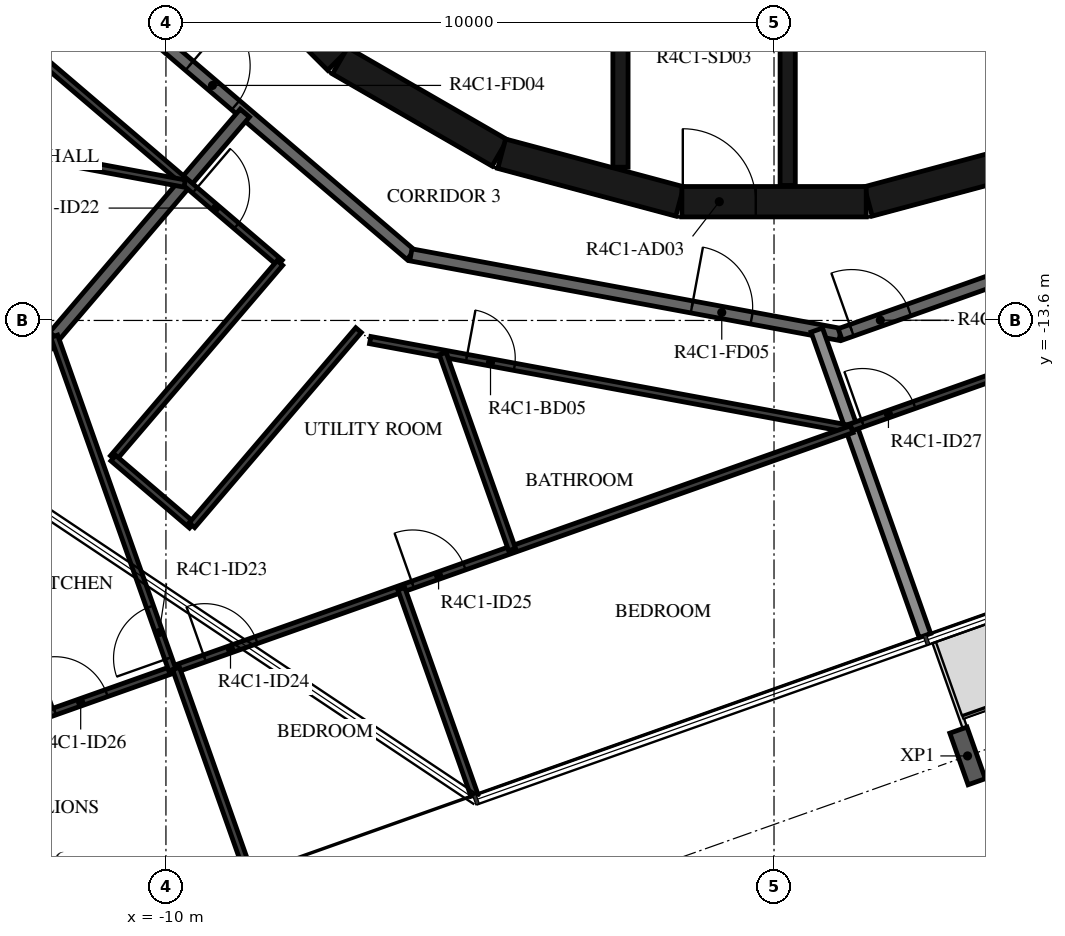
"""IFC4 building model, lengths in metres.
Left out: names, types, materials, properties, quantities, classifications, styles, units other than length and angle.
Written with IfcOpenShell. Run it as: python <this file> out.ifc"""

import sys

from ifc_helpers import new_model, si_unit, direction, frame, frame_2d, origin, origin_2d, place, context, subcontext, project, spatial, rectangle, i_section, extrude, element, fill, save


model = new_model("IFC4")
c1 = context("Model", 3, precision=1e-05, world=origin(), true_north=direction((0.0, 1.0)))
c2 = subcontext(c1, "Body", "Model", "MODEL_VIEW")
j1 = project(units=[si_unit("LENGTHUNIT", "METRE"), si_unit("PLANEANGLEUNIT", "RADIAN")], contexts=[c1])
p1 = place(None, origin())
s1 = spatial("IfcSite", under=j1, at=p1, CompositionType="ELEMENT")
p2 = place(p1, origin())
s2 = spatial("IfcBuilding", under=s1, at=p2, CompositionType="ELEMENT")
p3 = place(p2, frame((0.0, 0.0, 176.2)))
s3 = spatial("IfcBuildingStorey", under=s2, at=p3, CompositionType="ELEMENT", Elevation=176.2)
p4 = place(p3, frame((3.183, -20.761, -0.38), z_axis=(0.0, 0.0, 1.0), x_axis=(-0.942641392079, -0.333807138839, 0.0)))
e1 = element("IfcColumn", 1, at=p4, inside=s3, PredefinedType="COLUMN", context=c2, shape_type="SweptSolid", body=[
    extrude(i_section(OverallWidth=0.3, OverallDepth=0.9, WebThickness=0.019, FlangeThickness=0.035, FilletRadius=0.03, at=origin_2d()), origin(), (0.0, 0.0, 1.0), 3.5),
])
p5 = place(p3, frame((1.55, -11.643, 0.0), z_axis=(0.0, 0.0, 1.0), x_axis=(0.965948410781, 0.258734743916, 0.0)))
e2 = element("IfcWall", 2, at=p5, inside=s3, PredefinedType="SHEAR", context=c2, shape_type="SweptSolid", body=[
    extrude(rectangle(XDim=3.033, YDim=0.5, at=frame_2d((1.516, 0.0))), origin(), (0.0, 0.0, 1.0), 3.12),
])
p6 = place(p3, frame((-9.308, -7.164, 0.0), z_axis=(0.0, 0.0, 1.0), x_axis=(0.707106781187, -0.707106781187, 0.0)))
e3 = element("IfcWall", 3, at=p6, inside=s3, PredefinedType="SHEAR", context=c2, shape_type="SweptSolid", body=[
    extrude(rectangle(XDim=3.032, YDim=0.5, at=frame_2d((1.516, 0.0))), origin(), (0.0, 0.0, 1.0), 3.12),
])
for number, where, z_axis, x_axis in (
    (4, (-7.137, -9.329, 0.0), (0.0, 0.0, 1.0), (0.866, -0.5, 0.0)),
    (5, (-4.479, -10.858, 0.0), (0.0, 0.0, 1.0), (0.966, -0.259, 0.0)),
):
    element("IfcWall", number, at=place(p3, frame(where, z_axis=z_axis, x_axis=x_axis)), inside=s3, PredefinedType="SHEAR", context=c2, shape_type="SweptSolid", body=[
        extrude(rectangle(XDim=3.033, YDim=0.5, at=frame_2d((1.516, 0.0))), origin(), (0.0, 0.0, 1.0), 3.12),
    ])
p7 = place(p3, frame((-1.516, -11.647, 0.0), z_axis=(0.0, 0.0, 1.0), x_axis=(1.0, 0.0, 0.0)))
e6 = element("IfcWall", 6, at=p7, inside=s3, PredefinedType="SHEAR", context=c2, shape_type="SweptSolid", body=[
    extrude(rectangle(XDim=3.033, YDim=0.5, at=frame_2d((1.516, 0.0))), origin(), (0.0, 0.0, 1.0), 3.12),
])
p8 = place(p7, frame((0.016, 0.0, 0.0)))
e7 = element("IfcOpeningElement", 7, at=p8, cuts=e6, PredefinedType="OPENING", context=c2, shape_type="SweptSolid", body=[
    extrude(rectangle(XDim=1.2, YDim=2.1, at=frame_2d((0.6, 1.05))), frame((0.0, 0.26, 0.0), z_axis=(0.0, -1.0, 0.0), x_axis=(1.0, 0.0, 0.0)), (0.0, 0.0, 1.0), 0.52),
])
p9 = place(p3, frame((-2.525, -8.97, 0.0), z_axis=(0.0, 0.0, 1.0), x_axis=(0.0, -1.0, 0.0)))
e8 = element("IfcWall", 8, at=p9, inside=s3, PredefinedType="SHEAR", context=c2, shape_type="SweptSolid", body=[
    extrude(rectangle(XDim=2.11, YDim=0.25, at=frame_2d((1.055, 0.0))), origin(), (0.0, 0.0, 1.0), 3.12),
])
p10 = place(p3, frame((0.225, -8.97, 0.0), z_axis=(0.0, 0.0, 1.0), x_axis=(0.0, -1.0, 0.0)))
e9 = element("IfcWall", 9, at=p10, inside=s3, PredefinedType="SHEAR", context=c2, shape_type="SweptSolid", body=[
    extrude(rectangle(XDim=2.41, YDim=0.25, at=frame_2d((1.205, 0.0))), origin(), (0.0, 0.0, 1.0), 3.12),
])
p11 = place(p3, frame((-11.433, -7.858, 0.0), z_axis=(0.0, 0.0, 1.0), x_axis=(0.760412154545, -0.649440801937, 0.0)))
e10 = element("IfcWall", 10, at=p11, inside=s3, PredefinedType="STANDARD", context=c2, shape_type="SweptSolid", body=[
    extrude(rectangle(XDim=7.181, YDim=0.2, at=frame_2d((3.59, 0.0))), origin(), (0.0, 0.0, 1.0), 3.12),
])
p12 = place(p11, frame((2.39, 0.0, 0.0)))
e11 = element("IfcOpeningElement", 11, at=p12, cuts=e10, PredefinedType="OPENING", context=c2, shape_type="SweptSolid", body=[
    extrude(rectangle(XDim=1.0, YDim=2.1, at=frame_2d((0.5, 1.05))), frame((0.0, 0.11, 0.0), z_axis=(0.0, -1.0, 0.0), x_axis=(1.0, 0.0, 0.0)), (0.0, 0.0, 1.0), 0.22),
])
p13 = place(p3, frame((-5.972, -12.521, 0.0), z_axis=(0.0, 0.0, 1.0), x_axis=(0.983256068163, -0.18222926335, 0.0)))
e12 = element("IfcWall", 12, at=p13, inside=s3, PredefinedType="STANDARD", context=c2, shape_type="SweptSolid", body=[
    extrude(rectangle(XDim=7.181, YDim=0.2, at=frame_2d((3.59, 0.0))), origin(), (0.0, 0.0, 1.0), 3.12),
])
p14 = place(p13, frame((4.7, 0.0, 0.0)))
e13 = element("IfcOpeningElement", 13, at=p14, cuts=e12, PredefinedType="OPENING", context=c2, shape_type="SweptSolid", body=[
    extrude(rectangle(XDim=1.0, YDim=2.1, at=frame_2d((0.5, 1.05))), frame((0.0, 0.11, 0.0), z_axis=(0.0, -1.0, 0.0), x_axis=(1.0, 0.0, 0.0)), (0.0, 0.0, 1.0), 0.22),
])
p15 = place(p3, frame((1.088, -13.83, 0.0), z_axis=(0.0, 0.0, 1.0), x_axis=(0.942648397945, 0.333787354241, 0.0)))
e14 = element("IfcWall", 14, at=p15, inside=s3, PredefinedType="STANDARD", context=c2, shape_type="SweptSolid", body=[
    extrude(rectangle(XDim=7.181, YDim=0.2, at=frame_2d((3.591, 0.0))), origin(), (0.0, 0.0, 1.0), 3.12),
])
p16 = place(p15, frame((0.2, 0.0, 0.0)))
e15 = element("IfcOpeningElement", 15, at=p16, cuts=e14, PredefinedType="OPENING", context=c2, shape_type="SweptSolid", body=[
    extrude(rectangle(XDim=1.0, YDim=2.1, at=frame_2d((0.5, 1.05))), frame((0.0, 0.11, 0.0), z_axis=(0.0, -1.0, 0.0), x_axis=(1.0, 0.0, 0.0)), (0.0, 0.0, 1.0), 0.22),
])
p17 = place(p3, frame((-11.838, -13.86, 0.0), z_axis=(0.0, 0.0, 1.0), x_axis=(0.64944503311, 0.760408540831, 0.0)))
e16 = element("IfcWall", 16, at=p17, inside=s3, PredefinedType="STANDARD", context=c2, shape_type="SweptSolid", body=[
    extrude(rectangle(XDim=4.827, YDim=0.2, at=frame_2d((2.414, 0.0))), origin(), (0.0, 0.0, 1.0), 3.12),
])
p18 = place(p3, frame((-12.443, -14.569, 0.0), z_axis=(0.0, 0.0, 1.0), x_axis=(0.649517408851, 0.760346720648, 0.0)))
e17 = element("IfcWall", 17, at=p18, inside=s3, PredefinedType="STANDARD", context=c2, shape_type="SweptSolid", body=[
    extrude(rectangle(XDim=0.932, YDim=0.2, at=frame_2d((0.466, 0.0))), origin(), (0.0, 0.0, 1.0), 3.12),
])
p19 = place(p3, frame((2.482, -18.782, 0.0), z_axis=(0.0, 0.0, 1.0), x_axis=(-0.333807281402, 0.942641341594, 0.0)))
e18 = element("IfcWall", 18, at=p19, inside=s3, PredefinedType="STANDARD", context=c2, shape_type="SweptSolid", body=[
    extrude(rectangle(XDim=5.329, YDim=0.2, at=frame_2d((2.665, 0.0))), origin(), (0.0, 0.0, 1.0), 2.73),
])
p20 = place(p3, frame((-12.713, -8.737, 0.0), z_axis=(0.0, 0.0, 1.0), x_axis=(0.760432387723, -0.649417110725, 0.0)))
e19 = element("IfcWall", 19, at=p20, inside=s3, PredefinedType="PARTITIONING", context=c2, shape_type="SweptSolid", body=[
    extrude(rectangle(XDim=6.032, YDim=0.12, at=frame_2d((3.016, 0.0))), origin(), (0.0, 0.0, 1.0), 3.12),
])
p21 = place(p20, frame((4.192, 0.0, 0.0)))
e20 = element("IfcOpeningElement", 20, at=p21, cuts=e19, PredefinedType="OPENING", context=c2, shape_type="SweptSolid", body=[
    extrude(rectangle(XDim=0.9, YDim=2.1, at=frame_2d((0.45, 1.05))), frame((0.0, 0.07, 0.0), z_axis=(0.0, -1.0, 0.0), x_axis=(1.0, 0.0, 0.0)), (0.0, 0.0, 1.0), 0.14),
])
p22 = place(p3, frame((-16.252, -10.133, 0.0), z_axis=(0.0, 0.0, 1.0), x_axis=(0.983256998026, -0.182224246005, 0.0)))
e21 = element("IfcWall", 21, at=p22, inside=s3, PredefinedType="PARTITIONING", context=c2, shape_type="SweptSolid", body=[
    extrude(rectangle(XDim=6.671, YDim=0.12, at=frame_2d((3.335, 0.0))), origin(), (0.0, 0.0, 1.0), 3.12),
])
p23 = place(p22, frame((0.2, 0.0, 0.0)))
e22 = element("IfcOpeningElement", 22, at=p23, cuts=e21, PredefinedType="OPENING", context=c2, shape_type="SweptSolid", body=[
    extrude(rectangle(XDim=0.9, YDim=2.1, at=frame_2d((0.45, 1.05))), frame((0.0, 0.07, 0.0), z_axis=(0.0, -1.0, 0.0), x_axis=(1.0, 0.0, 0.0)), (0.0, 0.0, 1.0), 0.14),
])
p24 = place(p3, frame((-8.125, -12.655, 0.0), z_axis=(0.0, 0.0, 1.0), x_axis=(-0.649441944702, -0.760411178549, 0.0)))
e23 = element("IfcWall", 23, at=p24, inside=s3, PredefinedType="PARTITIONING", context=c2, shape_type="SweptSolid", body=[
    extrude(rectangle(XDim=4.22, YDim=0.12, at=frame_2d((2.11, 0.0))), origin(), (0.0, 0.0, 1.0), 3.12),
])
p25 = place(p3, frame((-10.866, -15.864, 0.0), z_axis=(0.0, 0.0, 1.0), x_axis=(0.760431300628, -0.649418383652, 0.0)))
e24 = element("IfcWall", 24, at=p25, inside=s3, PredefinedType="PARTITIONING", context=c2, shape_type="SweptSolid", body=[
    extrude(rectangle(XDim=1.7, YDim=0.12, at=frame_2d((0.85, 0.0))), origin(), (0.0, 0.0, 1.0), 3.12),
])
p26 = place(p3, frame((-9.573, -16.968, 0.0), z_axis=(0.0, 0.0, 1.0), x_axis=(0.649437062208, 0.760415348498, 0.0)))
e25 = element("IfcWall", 25, at=p26, inside=s3, PredefinedType="PARTITIONING", context=c2, shape_type="SweptSolid", body=[
    extrude(rectangle(XDim=4.219, YDim=0.12, at=frame_2d((2.11, 0.0))), origin(), (0.0, 0.0, 1.0), 3.12),
])
p27 = place(p3, frame((-6.641, -13.923, 0.0), z_axis=(0.0, 0.0, 1.0), x_axis=(0.983250157272, -0.182261153912, 0.0)))
e26 = element("IfcWall", 26, at=p27, inside=s3, PredefinedType="PARTITIONING", context=c2, shape_type="SweptSolid", body=[
    extrude(rectangle(XDim=7.985, YDim=0.12, at=frame_2d((3.992, 0.0))), origin(), (0.0, 0.0, 1.0), 3.12),
])
p28 = place(p27, frame((1.612, 0.0, 0.0)))
e27 = element("IfcOpeningElement", 27, at=p28, cuts=e26, PredefinedType="OPENING", context=c2, shape_type="SweptSolid", body=[
    extrude(rectangle(XDim=0.8, YDim=2.1, at=frame_2d((0.4, 1.05))), frame((0.0, 0.07, 0.0), z_axis=(0.0, -1.0, 0.0), x_axis=(1.0, 0.0, 0.0)), (0.0, 0.0, 1.0), 0.14),
])
p29 = place(p3, frame((-12.015, -20.096, 0.0), z_axis=(0.0, 0.0, 1.0), x_axis=(0.942638913957, 0.33381413675, 0.0)))
e28 = element("IfcWall", 28, at=p29, inside=s3, PredefinedType="PARTITIONING", context=c2, shape_type="SweptSolid", body=[
    extrude(rectangle(XDim=14.104, YDim=0.12, at=frame_2d((7.052, 0.0))), origin(), (0.0, 0.0, 1.0), 3.12),
])
p30 = place(p29, frame((2.814, 0.0, 0.0)))
e29 = element("IfcOpeningElement", 29, at=p30, cuts=e28, PredefinedType="OPENING", context=c2, shape_type="SweptSolid", body=[
    extrude(rectangle(XDim=0.9, YDim=2.1, at=frame_2d((0.45, 1.05))), frame((0.0, 0.07, 0.0), z_axis=(0.0, -1.0, 0.0), x_axis=(1.0, 0.0, 0.0)), (0.0, 0.0, 1.0), 0.14),
])
p31 = place(p29, frame((6.444, 0.0, 0.0)))
e30 = element("IfcOpeningElement", 30, at=p31, cuts=e28, PredefinedType="OPENING", context=c2, shape_type="SweptSolid", body=[
    extrude(rectangle(XDim=0.9, YDim=2.1, at=frame_2d((0.45, 1.05))), frame((0.0, 0.07, 0.0), z_axis=(0.0, -1.0, 0.0), x_axis=(1.0, 0.0, 0.0)), (0.0, 0.0, 1.0), 0.14),
])
p32 = place(p29, frame((0.2, 0.0, 0.0)))
e31 = element("IfcOpeningElement", 31, at=p32, cuts=e28, PredefinedType="OPENING", context=c2, shape_type="SweptSolid", body=[
    extrude(rectangle(XDim=0.9, YDim=2.1, at=frame_2d((0.45, 1.05))), frame((0.0, 0.07, 0.0), z_axis=(0.0, -1.0, 0.0), x_axis=(1.0, 0.0, 0.0)), (0.0, 0.0, 1.0), 0.14),
])
p33 = place(p3, frame((-9.895, -19.346, 0.0), z_axis=(0.0, 0.0, 1.0), x_axis=(-0.333781129158, 0.942650602195, 0.0)))
e32 = element("IfcWall", 32, at=p33, inside=s3, PredefinedType="PARTITIONING", context=c2, shape_type="SweptSolid", body=[
    extrude(rectangle(XDim=5.819, YDim=0.12, at=frame_2d((2.91, 0.0))), origin(), (0.0, 0.0, 1.0), 3.12),
])
p34 = place(p33, frame((0.2, 0.0, 0.0)))
e33 = element("IfcOpeningElement", 33, at=p34, cuts=e32, PredefinedType="OPENING", context=c2, shape_type="SweptSolid", body=[
    extrude(rectangle(XDim=0.9, YDim=2.1, at=frame_2d((0.45, 1.05))), frame((0.0, 0.07, 0.0), z_axis=(0.0, -1.0, 0.0), x_axis=(1.0, 0.0, 0.0)), (0.0, 0.0, 1.0), 0.14),
])
p35 = place(p3, frame((-8.632, -22.718, 0.0), z_axis=(0.0, 0.0, 1.0), x_axis=(-0.333791905243, 0.942646786445, 0.0)))
e34 = element("IfcWall", 34, at=p35, inside=s3, PredefinedType="PARTITIONING", context=c2, shape_type="SweptSolid", body=[
    extrude(rectangle(XDim=3.6, YDim=0.12, at=frame_2d((1.8, 0.0))), origin(), (0.0, 0.0, 1.0), 3.12),
])
p36 = place(p3, frame((-4.308, -17.367, 0.0), z_axis=(0.0, 0.0, 1.0), x_axis=(-0.333802202677, 0.942643140052, 0.0)))
e35 = element("IfcWall", 35, at=p36, inside=s3, PredefinedType="PARTITIONING", context=c2, shape_type="SweptSolid", body=[
    extrude(rectangle(XDim=3.419, YDim=0.12, at=frame_2d((1.709, 0.0))), origin(), (0.0, 0.0, 1.0), 3.12),
])
p37 = place(p3, frame((-4.927, -21.406, 0.0), z_axis=(0.0, 0.0, 1.0), x_axis=(-0.333813244781, 0.942639229827, 0.0)))
e36 = element("IfcWall", 36, at=p37, inside=s3, PredefinedType="PARTITIONING", context=c2, shape_type="SweptSolid", body=[
    extrude(rectangle(XDim=3.6, YDim=0.12, at=frame_2d((1.8, 0.0))), origin(), (0.0, 0.0, 1.0), 2.73),
])
p38 = place(p3, frame((1.269, -15.357, 0.0), z_axis=(0.0, 0.0, 1.0), x_axis=(0.942639442898, 0.333812643101, 0.0)))
e37 = element("IfcWall", 37, at=p38, inside=s3, PredefinedType="PARTITIONING", context=c2, shape_type="SweptSolid", body=[
    extrude(rectangle(XDim=7.86, YDim=0.12, at=frame_2d((3.93, 0.0))), origin(), (0.0, 0.0, 1.0), 3.12),
])
p39 = place(p38, frame((0.2, 0.0, 0.0)))
e38 = element("IfcOpeningElement", 38, at=p39, cuts=e37, PredefinedType="OPENING", context=c2, shape_type="SweptSolid", body=[
    extrude(rectangle(XDim=0.9, YDim=2.1, at=frame_2d((0.45, 1.05))), frame((0.0, 0.07, 0.0), z_axis=(0.0, -1.0, 0.0), x_axis=(1.0, 0.0, 0.0)), (0.0, 0.0, 1.0), 0.14),
])
p40 = place(p8, origin())
e39 = element("IfcDoor", 39, at=p40, inside=s3, OperationType="SINGLE_SWING_RIGHT", PredefinedType="DOOR", context=c2, shape_type="SweptSolid", body=[
    extrude(rectangle(XDim=1.2, YDim=2.1, at=frame_2d((0.6, 1.05))), frame((0.0, 0.025, 0.0), z_axis=(0.0, -1.0, 0.0), x_axis=(1.0, 0.0, 0.0)), (0.0, 0.0, 1.0), 0.05),
])
fill(e7, e39)
p41 = place(p12, origin())
e40 = element("IfcDoor", 40, at=p41, inside=s3, OperationType="SINGLE_SWING_RIGHT", PredefinedType="DOOR", context=c2, shape_type="SweptSolid", body=[
    extrude(rectangle(XDim=1.0, YDim=2.1, at=frame_2d((0.5, 1.05))), frame((0.0, 0.025, 0.0), z_axis=(0.0, -1.0, 0.0), x_axis=(1.0, 0.0, 0.0)), (0.0, 0.0, 1.0), 0.05),
])
fill(e11, e40)
p42 = place(p14, origin())
e41 = element("IfcDoor", 41, at=p42, inside=s3, OperationType="SINGLE_SWING_LEFT", PredefinedType="DOOR", context=c2, shape_type="SweptSolid", body=[
    extrude(rectangle(XDim=1.0, YDim=2.1, at=frame_2d((0.5, 1.05))), frame((0.0, 0.025, 0.0), z_axis=(0.0, -1.0, 0.0), x_axis=(1.0, 0.0, 0.0)), (0.0, 0.0, 1.0), 0.05),
])
fill(e13, e41)
p43 = place(p21, origin())
e42 = element("IfcDoor", 42, at=p43, inside=s3, OperationType="SINGLE_SWING_LEFT", PredefinedType="DOOR", context=c2, shape_type="SweptSolid", body=[
    extrude(rectangle(XDim=0.9, YDim=2.1, at=frame_2d((0.45, 1.05))), frame((0.0, 0.025, 0.0), z_axis=(0.0, -1.0, 0.0), x_axis=(1.0, 0.0, 0.0)), (0.0, 0.0, 1.0), 0.05),
])
fill(e20, e42)
p44 = place(p28, origin())
e43 = element("IfcDoor", 43, at=p44, inside=s3, OperationType="SINGLE_SWING_LEFT", PredefinedType="DOOR", context=c2, shape_type="SweptSolid", body=[
    extrude(rectangle(XDim=0.8, YDim=2.1, at=frame_2d((0.4, 1.05))), frame((0.0, 0.025, 0.0), z_axis=(0.0, -1.0, 0.0), x_axis=(1.0, 0.0, 0.0)), (0.0, 0.0, 1.0), 0.05),
])
fill(e27, e43)
p45 = place(p34, origin())
e44 = element("IfcDoor", 44, at=p45, inside=s3, OperationType="SINGLE_SWING_LEFT", PredefinedType="DOOR", context=c2, shape_type="SweptSolid", body=[
    extrude(rectangle(XDim=0.9, YDim=2.1, at=frame_2d((0.45, 1.05))), frame((0.0, 0.025, 0.0), z_axis=(0.0, -1.0, 0.0), x_axis=(1.0, 0.0, 0.0)), (0.0, 0.0, 1.0), 0.05),
])
fill(e33, e44)
p46 = place(p30, origin())
e45 = element("IfcDoor", 45, at=p46, inside=s3, OperationType="SINGLE_SWING_LEFT", PredefinedType="DOOR", context=c2, shape_type="SweptSolid", body=[
    extrude(rectangle(XDim=0.9, YDim=2.1, at=frame_2d((0.45, 1.05))), frame((0.0, 0.025, 0.0), z_axis=(0.0, -1.0, 0.0), x_axis=(1.0, 0.0, 0.0)), (0.0, 0.0, 1.0), 0.05),
])
fill(e29, e45)
p47 = place(p31, origin())
e46 = element("IfcDoor", 46, at=p47, inside=s3, OperationType="SINGLE_SWING_LEFT", PredefinedType="DOOR", context=c2, shape_type="SweptSolid", body=[
    extrude(rectangle(XDim=0.9, YDim=2.1, at=frame_2d((0.45, 1.05))), frame((0.0, 0.025, 0.0), z_axis=(0.0, -1.0, 0.0), x_axis=(1.0, 0.0, 0.0)), (0.0, 0.0, 1.0), 0.05),
])
fill(e30, e46)
p48 = place(p32, origin())
e47 = element("IfcDoor", 47, at=p48, inside=s3, OperationType="SINGLE_SWING_RIGHT", PredefinedType="DOOR", context=c2, shape_type="SweptSolid", body=[
    extrude(rectangle(XDim=0.9, YDim=2.1, at=frame_2d((0.45, 1.05))), frame((0.0, 0.025, 0.0), z_axis=(0.0, -1.0, 0.0), x_axis=(1.0, 0.0, 0.0)), (0.0, 0.0, 1.0), 0.05),
])
fill(e31, e47)
p49 = place(p16, origin())
e48 = element("IfcDoor", 48, at=p49, inside=s3, OperationType="SINGLE_SWING_LEFT", PredefinedType="DOOR", context=c2, shape_type="SweptSolid", body=[
    extrude(rectangle(XDim=1.0, YDim=2.1, at=frame_2d((0.5, 1.05))), frame((0.0, 0.025, 0.0), z_axis=(0.0, -1.0, 0.0), x_axis=(1.0, 0.0, 0.0)), (0.0, 0.0, 1.0), 0.05),
])
fill(e15, e48)
p50 = place(p39, origin())
e49 = element("IfcDoor", 49, at=p50, inside=s3, OperationType="SINGLE_SWING_LEFT", PredefinedType="DOOR", context=c2, shape_type="SweptSolid", body=[
    extrude(rectangle(XDim=0.9, YDim=2.1, at=frame_2d((0.45, 1.05))), frame((0.0, 0.025, 0.0), z_axis=(0.0, -1.0, 0.0), x_axis=(1.0, 0.0, 0.0)), (0.0, 0.0, 1.0), 0.05),
])
fill(e38, e49)
save(model, sys.argv[1])
